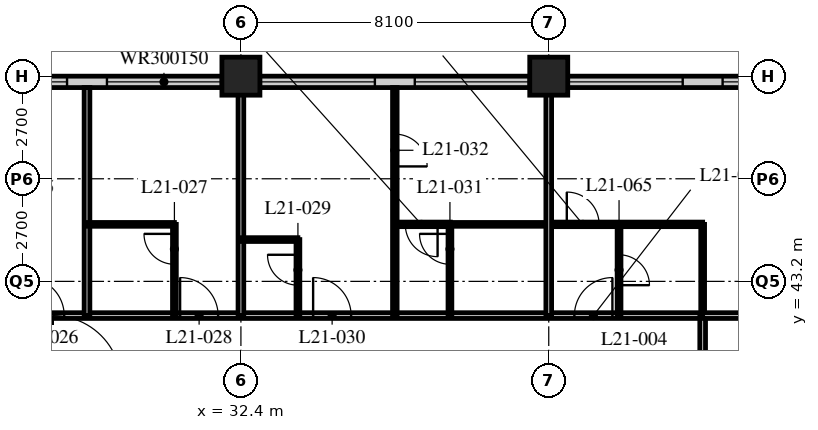
"""IFC4 building model, lengths in metres.
Left out: names, types, materials, properties, quantities, classifications, styles, units other than length and angle.
Written with IfcOpenShell. Run it as: python <this file> out.ifc"""

import sys

from ifc_helpers import new_model, si_unit, direction, frame, frame_2d, origin, origin_2d, place, context, subcontext, project, spatial, rectangle, hollow_rectangle, extrude, element, fill, save


model = new_model("IFC4")
c1 = context("Model", 3, precision=1e-05, world=origin(), true_north=direction((0.0, 1.0)))
c2 = subcontext(c1, "Body", "Model", "MODEL_VIEW")
j1 = project(units=[si_unit("LENGTHUNIT", "METRE"), si_unit("PLANEANGLEUNIT", "RADIAN")], contexts=[c1])
p1 = place(None, origin())
s1 = spatial("IfcSite", under=j1, at=p1, CompositionType="ELEMENT")
p2 = place(p1, origin())
s2 = spatial("IfcBuilding", under=s1, at=p2, CompositionType="ELEMENT")
p3 = place(p2, frame((0.0, 0.0, 84.0)))
s3 = spatial("IfcBuildingStorey", under=s2, at=p3, CompositionType="ELEMENT", Elevation=84.0)
for number, where, z_axis, x_axis in (
    (1, (32.4, 48.6, 0.0), (0.0, 0.0, 1.0), (1.0, 0.0, 0.0)),
    (2, (40.5, 48.6, 0.0), (0.0, 0.0, 1.0), (1.0, 0.0, 0.0)),
):
    element("IfcColumn", number, at=place(p3, frame(where, z_axis=z_axis, x_axis=x_axis)), inside=s3, PredefinedType="COLUMN", context=c2, shape_type="SweptSolid", body=[
        extrude(hollow_rectangle(XDim=1.0, YDim=1.0, WallThickness=0.1, at=origin_2d()), origin(), (0.0, 0.0, 1.0), 3.4),
    ])
p4 = place(p3, frame((48.3, 48.45, 0.0), z_axis=(0.0, 0.0, 1.0), x_axis=(-1.0, 0.0, 0.0)))
e3 = element("IfcWall", 3, at=p4, inside=s3, PredefinedType="SOLIDWALL", context=c2, shape_type="SweptSolid", body=[
    extrude(rectangle(XDim=40.2, YDim=0.3, at=frame_2d((20.1, 0.0))), origin(), (0.0, 0.0, 1.0), 3.19),
])
p5 = place(p4, frame((0.225, 0.0, 0.9)))
e4 = element("IfcOpeningElement", 4, at=p5, cuts=e3, PredefinedType="OPENING", context=c2, shape_type="SweptSolid", body=[
    extrude(rectangle(XDim=3.0, YDim=1.5, at=frame_2d((1.5, 0.75))), frame((0.0, 0.16, 0.0), z_axis=(0.0, -1.0, 0.0), x_axis=(1.0, 0.0, 0.0)), (0.0, 0.0, 1.0), 0.32),
])
p6 = place(p4, frame((4.275, 0.0, 0.9)))
e5 = element("IfcOpeningElement", 5, at=p6, cuts=e3, PredefinedType="OPENING", context=c2, shape_type="SweptSolid", body=[
    extrude(rectangle(XDim=3.0, YDim=1.5, at=frame_2d((1.5, 0.75))), frame((0.0, 0.16, 0.0), z_axis=(0.0, -1.0, 0.0), x_axis=(1.0, 0.0, 0.0)), (0.0, 0.0, 1.0), 0.32),
])
p7 = place(p4, frame((8.325, 0.0, 0.9)))
e6 = element("IfcOpeningElement", 6, at=p7, cuts=e3, PredefinedType="OPENING", context=c2, shape_type="SweptSolid", body=[
    extrude(rectangle(XDim=3.0, YDim=1.5, at=frame_2d((1.5, 0.75))), frame((0.0, 0.16, 0.0), z_axis=(0.0, -1.0, 0.0), x_axis=(1.0, 0.0, 0.0)), (0.0, 0.0, 1.0), 0.32),
])
p8 = place(p4, frame((12.375, 0.0, 0.9)))
e7 = element("IfcOpeningElement", 7, at=p8, cuts=e3, PredefinedType="OPENING", context=c2, shape_type="SweptSolid", body=[
    extrude(rectangle(XDim=3.0, YDim=1.5, at=frame_2d((1.5, 0.75))), frame((0.0, 0.16, 0.0), z_axis=(0.0, -1.0, 0.0), x_axis=(1.0, 0.0, 0.0)), (0.0, 0.0, 1.0), 0.32),
])
p9 = place(p4, frame((16.425, 0.0, 0.9)))
e8 = element("IfcOpeningElement", 8, at=p9, cuts=e3, PredefinedType="OPENING", context=c2, shape_type="SweptSolid", body=[
    extrude(rectangle(XDim=3.0, YDim=1.5, at=frame_2d((1.5, 0.75))), frame((0.0, 0.16, 0.0), z_axis=(0.0, -1.0, 0.0), x_axis=(1.0, 0.0, 0.0)), (0.0, 0.0, 1.0), 0.32),
])
p10 = place(p4, frame((20.475, 0.0, 0.9)))
e9 = element("IfcOpeningElement", 9, at=p10, cuts=e3, PredefinedType="OPENING", context=c2, shape_type="SweptSolid", body=[
    extrude(rectangle(XDim=3.0, YDim=1.5, at=frame_2d((1.5, 0.75))), frame((0.0, 0.16, 0.0), z_axis=(0.0, -1.0, 0.0), x_axis=(1.0, 0.0, 0.0)), (0.0, 0.0, 1.0), 0.32),
])
p11 = place(p4, frame((24.525, 0.0, 0.9)))
e10 = element("IfcOpeningElement", 10, at=p11, cuts=e3, PredefinedType="OPENING", context=c2, shape_type="SweptSolid", body=[
    extrude(rectangle(XDim=3.0, YDim=1.5, at=frame_2d((1.5, 0.75))), frame((0.0, 0.16, 0.0), z_axis=(0.0, -1.0, 0.0), x_axis=(1.0, 0.0, 0.0)), (0.0, 0.0, 1.0), 0.32),
])
p12 = place(p4, frame((28.575, 0.0, 0.9)))
e11 = element("IfcOpeningElement", 11, at=p12, cuts=e3, PredefinedType="OPENING", context=c2, shape_type="SweptSolid", body=[
    extrude(rectangle(XDim=3.0, YDim=1.5, at=frame_2d((1.5, 0.75))), frame((0.0, 0.16, 0.0), z_axis=(0.0, -1.0, 0.0), x_axis=(1.0, 0.0, 0.0)), (0.0, 0.0, 1.0), 0.32),
])
p13 = place(p4, frame((32.625, 0.0, 0.9)))
e12 = element("IfcOpeningElement", 12, at=p13, cuts=e3, PredefinedType="OPENING", context=c2, shape_type="SweptSolid", body=[
    extrude(rectangle(XDim=3.0, YDim=1.5, at=frame_2d((1.5, 0.75))), frame((0.0, 0.16, 0.0), z_axis=(0.0, -1.0, 0.0), x_axis=(1.0, 0.0, 0.0)), (0.0, 0.0, 1.0), 0.32),
])
p14 = place(p4, frame((36.675, 0.0, 0.9)))
e13 = element("IfcOpeningElement", 13, at=p14, cuts=e3, PredefinedType="OPENING", context=c2, shape_type="SweptSolid", body=[
    extrude(rectangle(XDim=3.0, YDim=1.5, at=frame_2d((1.5, 0.75))), frame((0.0, 0.16, 0.0), z_axis=(0.0, -1.0, 0.0), x_axis=(1.0, 0.0, 0.0)), (0.0, 0.0, 1.0), 0.32),
])
p15 = place(p3, frame((12.15, 42.3, 0.0), z_axis=(0.0, 0.0, 1.0), x_axis=(1.0, 0.0, 0.0)))
e14 = element("IfcWall", 14, at=p15, inside=s3, PredefinedType="PARTITIONING", context=c2, shape_type="SweptSolid", body=[
    extrude(rectangle(XDim=32.4, YDim=0.15, at=frame_2d((16.2, 0.0))), origin(), (0.0, 0.0, 1.0), 3.19),
])
p16 = place(p15, frame((5.95, 0.0, 0.0)))
e15 = element("IfcOpeningElement", 15, at=p16, cuts=e14, PredefinedType="OPENING", context=c2, shape_type="SweptSolid", body=[
    extrude(rectangle(XDim=1.0, YDim=2.1, at=frame_2d((0.5, 1.05))), frame((0.0, 0.085, 0.0), z_axis=(0.0, -1.0, 0.0), x_axis=(1.0, 0.0, 0.0)), (0.0, 0.0, 1.0), 0.17),
])
p17 = place(p15, frame((14.6, 0.0, 0.0)))
e16 = element("IfcOpeningElement", 16, at=p17, cuts=e14, PredefinedType="OPENING", context=c2, shape_type="SweptSolid", body=[
    extrude(rectangle(XDim=1.0, YDim=2.1, at=frame_2d((0.5, 1.05))), frame((0.0, 0.085, 0.0), z_axis=(0.0, -1.0, 0.0), x_axis=(1.0, 0.0, 0.0)), (0.0, 0.0, 1.0), 0.17),
])
p18 = place(p15, frame((18.65, 0.0, 0.0)))
e17 = element("IfcOpeningElement", 17, at=p18, cuts=e14, PredefinedType="OPENING", context=c2, shape_type="SweptSolid", body=[
    extrude(rectangle(XDim=1.0, YDim=2.1, at=frame_2d((0.5, 1.05))), frame((0.0, 0.085, 0.0), z_axis=(0.0, -1.0, 0.0), x_axis=(1.0, 0.0, 0.0)), (0.0, 0.0, 1.0), 0.17),
])
p19 = place(p15, frame((22.15, 0.0, 0.0)))
e18 = element("IfcOpeningElement", 18, at=p19, cuts=e14, PredefinedType="OPENING", context=c2, shape_type="SweptSolid", body=[
    extrude(rectangle(XDim=1.0, YDim=2.1, at=frame_2d((0.5, 1.05))), frame((0.0, 0.085, 0.0), z_axis=(0.0, -1.0, 0.0), x_axis=(1.0, 0.0, 0.0)), (0.0, 0.0, 1.0), 0.17),
])
p20 = place(p15, frame((29.025, 0.0, 0.0)))
e19 = element("IfcOpeningElement", 19, at=p20, cuts=e14, PredefinedType="OPENING", context=c2, shape_type="SweptSolid", body=[
    extrude(rectangle(XDim=1.0, YDim=2.1, at=frame_2d((0.5, 1.05))), frame((0.0, 0.085, 0.0), z_axis=(0.0, -1.0, 0.0), x_axis=(1.0, 0.0, 0.0)), (0.0, 0.0, 1.0), 0.17),
])
p21 = place(p15, frame((2.375, 0.0, 0.0)))
e20 = element("IfcOpeningElement", 20, at=p21, cuts=e14, PredefinedType="OPENING", context=c2, shape_type="SweptSolid", body=[
    extrude(rectangle(XDim=1.0, YDim=2.1, at=frame_2d((0.5, 1.05))), frame((0.0, 0.085, 0.0), z_axis=(0.0, -1.0, 0.0), x_axis=(1.0, 0.0, 0.0)), (0.0, 0.0, 1.0), 0.17),
])
p22 = place(p3, frame((44.55, 16.2, 0.0), z_axis=(0.0, 0.0, 1.0), x_axis=(0.0, 1.0, 0.0)))
e21 = element("IfcWall", 21, at=p22, inside=s3, PredefinedType="PARTITIONING", context=c2, shape_type="SweptSolid", body=[
    extrude(rectangle(XDim=26.1, YDim=0.15, at=frame_2d((13.05, 0.0))), origin(), (0.0, 0.0, 1.0), 3.19),
])
p23 = place(p22, frame((2.75, 0.0, 0.0)))
e22 = element("IfcOpeningElement", 22, at=p23, cuts=e21, PredefinedType="OPENING", context=c2, shape_type="SweptSolid", body=[
    extrude(rectangle(XDim=1.0, YDim=2.1, at=frame_2d((0.5, 1.05))), frame((0.0, 0.085, 0.0), z_axis=(0.0, -1.0, 0.0), x_axis=(1.0, 0.0, 0.0)), (0.0, 0.0, 1.0), 0.17),
])
p24 = place(p22, frame((6.5, 0.0, 0.0)))
e23 = element("IfcOpeningElement", 23, at=p24, cuts=e21, PredefinedType="OPENING", context=c2, shape_type="SweptSolid", body=[
    extrude(rectangle(XDim=1.0, YDim=2.1, at=frame_2d((0.5, 1.05))), frame((0.0, 0.085, 0.0), z_axis=(0.0, -1.0, 0.0), x_axis=(1.0, 0.0, 0.0)), (0.0, 0.0, 1.0), 0.17),
])
p25 = place(p22, frame((10.0, 0.0, 0.0)))
e24 = element("IfcOpeningElement", 24, at=p25, cuts=e21, PredefinedType="OPENING", context=c2, shape_type="SweptSolid", body=[
    extrude(rectangle(XDim=1.0, YDim=2.1, at=frame_2d((0.5, 1.05))), frame((0.0, 0.085, 0.0), z_axis=(0.0, -1.0, 0.0), x_axis=(1.0, 0.0, 0.0)), (0.0, 0.0, 1.0), 0.17),
])
p26 = place(p22, frame((18.1, 0.0, 0.0)))
e25 = element("IfcOpeningElement", 25, at=p26, cuts=e21, PredefinedType="OPENING", context=c2, shape_type="SweptSolid", body=[
    extrude(rectangle(XDim=1.0, YDim=2.1, at=frame_2d((0.5, 1.05))), frame((0.0, 0.085, 0.0), z_axis=(0.0, -1.0, 0.0), x_axis=(1.0, 0.0, 0.0)), (0.0, 0.0, 1.0), 0.17),
])
p27 = place(p3, frame((28.35, 42.3, 0.0), z_axis=(0.0, 0.0, 1.0), x_axis=(0.0, 1.0, 0.0)))
e26 = element("IfcWall", 26, at=p27, inside=s3, PredefinedType="PARTITIONING", context=c2, shape_type="SweptSolid", body=[
    extrude(rectangle(XDim=6.0, YDim=0.15, at=frame_2d((3.0, 0.0))), origin(), (0.0, 0.0, 1.0), 3.19),
])
p28 = place(p3, frame((28.35, 44.7, 0.0), z_axis=(0.0, 0.0, 1.0), x_axis=(1.0, 0.0, 0.0)))
e27 = element("IfcWall", 27, at=p28, inside=s3, PredefinedType="PARTITIONING", context=c2, shape_type="SweptSolid", body=[
    extrude(rectangle(XDim=2.3, YDim=0.1, at=frame_2d((1.15, 0.0))), origin(), (0.0, 0.0, 1.0), 3.19),
])
p29 = place(p3, frame((30.65, 42.3, 0.0), z_axis=(0.0, 0.0, 1.0), x_axis=(0.0, 1.0, 0.0)))
e28 = element("IfcWall", 28, at=p29, inside=s3, PredefinedType="PARTITIONING", context=c2, shape_type="SweptSolid", body=[
    extrude(rectangle(XDim=2.4, YDim=0.1, at=frame_2d((1.2, 0.0))), origin(), (0.0, 0.0, 1.0), 3.19),
])
p30 = place(p29, frame((1.35, 0.0, 0.0)))
e29 = element("IfcOpeningElement", 29, at=p30, cuts=e28, PredefinedType="OPENING", context=c2, shape_type="SweptSolid", body=[
    extrude(rectangle(XDim=0.8, YDim=2.1, at=frame_2d((0.4, 1.05))), frame((0.0, 0.06, 0.0), z_axis=(0.0, -1.0, 0.0), x_axis=(1.0, 0.0, 0.0)), (0.0, 0.0, 1.0), 0.12),
])
p31 = place(p3, frame((32.4, 42.3, 0.0), z_axis=(0.0, 0.0, 1.0), x_axis=(0.0, 1.0, 0.0)))
e30 = element("IfcWall", 30, at=p31, inside=s3, PredefinedType="PARTITIONING", context=c2, shape_type="SweptSolid", body=[
    extrude(rectangle(XDim=6.0, YDim=0.15, at=frame_2d((3.0, 0.0))), origin(), (0.0, 0.0, 1.0), 2.428),
])
p32 = place(p3, frame((32.4, 44.3, 0.0), z_axis=(0.0, 0.0, 1.0), x_axis=(1.0, 0.0, 0.0)))
e31 = element("IfcWall", 31, at=p32, inside=s3, PredefinedType="PARTITIONING", context=c2, shape_type="SweptSolid", body=[
    extrude(rectangle(XDim=1.5, YDim=0.1, at=frame_2d((0.75, 0.0))), origin(), (0.0, 0.0, 1.0), 3.19),
])
p33 = place(p3, frame((33.9, 42.3, 0.0), z_axis=(0.0, 0.0, 1.0), x_axis=(0.0, 1.0, 0.0)))
e32 = element("IfcWall", 32, at=p33, inside=s3, PredefinedType="PARTITIONING", context=c2, shape_type="SweptSolid", body=[
    extrude(rectangle(XDim=2.0, YDim=0.1, at=frame_2d((1.0, 0.0))), origin(), (0.0, 0.0, 1.0), 3.19),
])
p34 = place(p33, frame((0.8, 0.0, 0.0)))
e33 = element("IfcOpeningElement", 33, at=p34, cuts=e32, PredefinedType="OPENING", context=c2, shape_type="SweptSolid", body=[
    extrude(rectangle(XDim=0.8, YDim=2.1, at=frame_2d((0.4, 1.05))), frame((0.0, 0.06, 0.0), z_axis=(0.0, -1.0, 0.0), x_axis=(1.0, 0.0, 0.0)), (0.0, 0.0, 1.0), 0.12),
])
p35 = place(p3, frame((37.9, 44.7, 0.0), z_axis=(0.0, 0.0, 1.0), x_axis=(1.0, 0.0, 0.0)))
e34 = element("IfcWall", 34, at=p35, inside=s3, PredefinedType="PARTITIONING", context=c2, shape_type="SweptSolid", body=[
    extrude(rectangle(XDim=2.6, YDim=0.1, at=frame_2d((1.3, 0.0))), origin(), (0.0, 0.0, 1.0), 3.19),
])
p36 = place(p3, frame((37.9, 42.3, 0.0), z_axis=(0.0, 0.0, 1.0), x_axis=(0.0, 1.0, 0.0)))
e35 = element("IfcWall", 35, at=p36, inside=s3, PredefinedType="PARTITIONING", context=c2, shape_type="SweptSolid", body=[
    extrude(rectangle(XDim=2.4, YDim=0.1, at=frame_2d((1.2, 0.0))), origin(), (0.0, 0.0, 1.0), 3.19),
])
p37 = place(p36, frame((1.35, 0.0, 0.0)))
e36 = element("IfcOpeningElement", 36, at=p37, cuts=e35, PredefinedType="OPENING", context=c2, shape_type="SweptSolid", body=[
    extrude(rectangle(XDim=0.8, YDim=2.1, at=frame_2d((0.4, 1.05))), frame((0.0, 0.06, 0.0), z_axis=(0.0, -1.0, 0.0), x_axis=(1.0, 0.0, 0.0)), (0.0, 0.0, 1.0), 0.12),
])
p38 = place(p3, frame((36.45, 42.3, 0.0), z_axis=(0.0, 0.0, 1.0), x_axis=(0.0, 1.0, 0.0)))
e37 = element("IfcWall", 37, at=p38, inside=s3, PredefinedType="PARTITIONING", context=c2, shape_type="SweptSolid", body=[
    extrude(rectangle(XDim=6.0, YDim=0.12, at=frame_2d((3.0, 0.0))), origin(), (0.0, 0.0, 1.0), 3.19),
])
p39 = place(p38, frame((3.925, 0.0, 0.0)))
e38 = element("IfcOpeningElement", 38, at=p39, cuts=e37, PredefinedType="OPENING", context=c2, shape_type="SweptSolid", body=[
    extrude(rectangle(XDim=0.85, YDim=2.1, at=frame_2d((0.425, 1.05))), frame((0.0, 0.07, 0.0), z_axis=(0.0, -1.0, 0.0), x_axis=(1.0, 0.0, 0.0)), (0.0, 0.0, 1.0), 0.14),
])
p40 = place(p3, frame((40.5, 44.7, 0.0), z_axis=(0.0, 0.0, 1.0), x_axis=(1.0, 0.0, 0.0)))
e39 = element("IfcWall", 39, at=p40, inside=s3, PredefinedType="PARTITIONING", context=c2, shape_type="SweptSolid", body=[
    extrude(rectangle(XDim=4.05, YDim=0.12, at=frame_2d((2.025, 0.0))), origin(), (0.0, 0.0, 1.0), 3.19),
])
p41 = place(p40, frame((0.475, 0.0, 0.0)))
e40 = element("IfcOpeningElement", 40, at=p41, cuts=e39, PredefinedType="OPENING", context=c2, shape_type="SweptSolid", body=[
    extrude(rectangle(XDim=0.85, YDim=2.1, at=frame_2d((0.425, 1.05))), frame((0.0, 0.07, 0.0), z_axis=(0.0, -1.0, 0.0), x_axis=(1.0, 0.0, 0.0)), (0.0, 0.0, 1.0), 0.14),
])
p42 = place(p3, frame((42.35, 42.3, 0.0), z_axis=(0.0, 0.0, 1.0), x_axis=(0.0, 1.0, 0.0)))
e41 = element("IfcWall", 41, at=p42, inside=s3, PredefinedType="PARTITIONING", context=c2, shape_type="SweptSolid", body=[
    extrude(rectangle(XDim=2.4, YDim=0.1, at=frame_2d((1.2, 0.0))), origin(), (0.0, 0.0, 1.0), 3.19),
])
p43 = place(p42, frame((0.8, 0.0, 0.0)))
e42 = element("IfcOpeningElement", 42, at=p43, cuts=e41, PredefinedType="OPENING", context=c2, shape_type="SweptSolid", body=[
    extrude(rectangle(XDim=0.8, YDim=2.1, at=frame_2d((0.4, 1.05))), frame((0.0, 0.06, 0.0), z_axis=(0.0, -1.0, 0.0), x_axis=(1.0, 0.0, 0.0)), (0.0, 0.0, 1.0), 0.12),
])
p44 = place(p3, frame((44.55, 42.3, 0.0), z_axis=(0.0, 0.0, 1.0), x_axis=(0.0, 1.0, 0.0)))
e43 = element("IfcWall", 43, at=p44, inside=s3, PredefinedType="PARTITIONING", context=c2, shape_type="SweptSolid", body=[
    extrude(rectangle(XDim=2.4, YDim=0.1, at=frame_2d((1.2, 0.0))), origin(), (0.0, 0.0, 1.0), 3.19),
])
p45 = place(p3, frame((44.55, 42.3, 0.0), z_axis=(0.0, 0.0, 1.0), x_axis=(1.0, 0.0, 0.0)))
e44 = element("IfcWall", 44, at=p45, inside=s3, PredefinedType="PARTITIONING", context=c2, shape_type="SweptSolid", body=[
    extrude(rectangle(XDim=7.8, YDim=0.15, at=frame_2d((3.9, 0.0))), origin(), (0.0, 0.0, 1.0), 3.19),
])
p46 = place(p3, frame((40.5, 42.3, 0.0), z_axis=(0.0, 0.0, 1.0), x_axis=(0.0, 1.0, 0.0)))
e45 = element("IfcWall", 45, at=p46, inside=s3, PredefinedType="PARTITIONING", context=c2, shape_type="SweptSolid", body=[
    extrude(rectangle(XDim=6.0, YDim=0.15, at=frame_2d((3.0, 0.0))), origin(), (0.0, 0.0, 1.0), 2.428),
])
p47 = place(p3, frame((36.45, 44.7, 0.0), z_axis=(0.0, 0.0, 1.0), x_axis=(1.0, 0.0, 0.0)))
e46 = element("IfcWall", 46, at=p47, inside=s3, PredefinedType="PARTITIONING", context=c2, shape_type="SweptSolid", body=[
    extrude(rectangle(XDim=1.46, YDim=0.12, at=frame_2d((0.73, 0.0))), origin(), (0.0, 0.0, 1.0), 3.19),
])
p48 = place(p47, frame((0.275, 0.0, 0.0)))
e47 = element("IfcOpeningElement", 47, at=p48, cuts=e46, PredefinedType="OPENING", context=c2, shape_type="SweptSolid", body=[
    extrude(rectangle(XDim=0.85, YDim=2.1, at=frame_2d((0.425, 1.05))), frame((0.0, 0.07, 0.0), z_axis=(0.0, -1.0, 0.0), x_axis=(1.0, 0.0, 0.0)), (0.0, 0.0, 1.0), 0.14),
])
p49 = place(p5, origin())
e48 = element("IfcWindow", 48, at=p49, inside=s3, PartitioningType="SINGLE_PANEL", PredefinedType="WINDOW", context=c2, shape_type="SweptSolid", body=[
    extrude(rectangle(XDim=3.0, YDim=1.5, at=frame_2d((1.5, 0.75))), frame((0.0, 0.03, 0.0), z_axis=(0.0, -1.0, 0.0), x_axis=(1.0, 0.0, 0.0)), (0.0, 0.0, 1.0), 0.06),
])
fill(e4, e48)
p50 = place(p6, origin())
e49 = element("IfcWindow", 49, at=p50, inside=s3, PartitioningType="SINGLE_PANEL", PredefinedType="WINDOW", context=c2, shape_type="SweptSolid", body=[
    extrude(rectangle(XDim=3.0, YDim=1.5, at=frame_2d((1.5, 0.75))), frame((0.0, 0.03, 0.0), z_axis=(0.0, -1.0, 0.0), x_axis=(1.0, 0.0, 0.0)), (0.0, 0.0, 1.0), 0.06),
])
fill(e5, e49)
p51 = place(p7, origin())
e50 = element("IfcWindow", 50, at=p51, inside=s3, PartitioningType="SINGLE_PANEL", PredefinedType="WINDOW", context=c2, shape_type="SweptSolid", body=[
    extrude(rectangle(XDim=3.0, YDim=1.5, at=frame_2d((1.5, 0.75))), frame((0.0, 0.03, 0.0), z_axis=(0.0, -1.0, 0.0), x_axis=(1.0, 0.0, 0.0)), (0.0, 0.0, 1.0), 0.06),
])
fill(e6, e50)
p52 = place(p8, origin())
e51 = element("IfcWindow", 51, at=p52, inside=s3, PartitioningType="SINGLE_PANEL", PredefinedType="WINDOW", context=c2, shape_type="SweptSolid", body=[
    extrude(rectangle(XDim=3.0, YDim=1.5, at=frame_2d((1.5, 0.75))), frame((0.0, 0.03, 0.0), z_axis=(0.0, -1.0, 0.0), x_axis=(1.0, 0.0, 0.0)), (0.0, 0.0, 1.0), 0.06),
])
fill(e7, e51)
p53 = place(p9, origin())
e52 = element("IfcWindow", 52, at=p53, inside=s3, PartitioningType="SINGLE_PANEL", PredefinedType="WINDOW", context=c2, shape_type="SweptSolid", body=[
    extrude(rectangle(XDim=3.0, YDim=1.5, at=frame_2d((1.5, 0.75))), frame((0.0, 0.03, 0.0), z_axis=(0.0, -1.0, 0.0), x_axis=(1.0, 0.0, 0.0)), (0.0, 0.0, 1.0), 0.06),
])
fill(e8, e52)
p54 = place(p10, origin())
e53 = element("IfcWindow", 53, at=p54, inside=s3, PartitioningType="SINGLE_PANEL", PredefinedType="WINDOW", context=c2, shape_type="SweptSolid", body=[
    extrude(rectangle(XDim=3.0, YDim=1.5, at=frame_2d((1.5, 0.75))), frame((0.0, 0.03, 0.0), z_axis=(0.0, -1.0, 0.0), x_axis=(1.0, 0.0, 0.0)), (0.0, 0.0, 1.0), 0.06),
])
fill(e9, e53)
p55 = place(p17, origin())
e54 = element("IfcDoor", 54, at=p55, inside=s3, OperationType="SINGLE_SWING_LEFT", PredefinedType="DOOR", context=c2, shape_type="SweptSolid", body=[
    extrude(rectangle(XDim=1.0, YDim=2.1, at=frame_2d((0.5, 1.05))), frame((0.0, 0.025, 0.0), z_axis=(0.0, -1.0, 0.0), x_axis=(1.0, 0.0, 0.0)), (0.0, 0.0, 1.0), 0.05),
])
fill(e16, e54)
p56 = place(p30, origin())
e55 = element("IfcDoor", 55, at=p56, inside=s3, OperationType="SINGLE_SWING_RIGHT", PredefinedType="DOOR", context=c2, shape_type="SweptSolid", body=[
    extrude(rectangle(XDim=0.8, YDim=2.1, at=frame_2d((0.4, 1.05))), frame((0.0, 0.025, 0.0), z_axis=(0.0, -1.0, 0.0), x_axis=(1.0, 0.0, 0.0)), (0.0, 0.0, 1.0), 0.05),
])
fill(e29, e55)
p57 = place(p18, origin())
e56 = element("IfcDoor", 56, at=p57, inside=s3, OperationType="SINGLE_SWING_LEFT", PredefinedType="DOOR", context=c2, shape_type="SweptSolid", body=[
    extrude(rectangle(XDim=1.0, YDim=2.1, at=frame_2d((0.5, 1.05))), frame((0.0, 0.025, 0.0), z_axis=(0.0, -1.0, 0.0), x_axis=(1.0, 0.0, 0.0)), (0.0, 0.0, 1.0), 0.05),
])
fill(e17, e56)
p58 = place(p34, origin())
e57 = element("IfcDoor", 57, at=p58, inside=s3, OperationType="SINGLE_SWING_RIGHT", PredefinedType="DOOR", context=c2, shape_type="SweptSolid", body=[
    extrude(rectangle(XDim=0.8, YDim=2.1, at=frame_2d((0.4, 1.05))), frame((0.0, 0.025, 0.0), z_axis=(0.0, -1.0, 0.0), x_axis=(1.0, 0.0, 0.0)), (0.0, 0.0, 1.0), 0.05),
])
fill(e33, e57)
p59 = place(p19, origin())
e58 = element("IfcDoor", 58, at=p59, inside=s3, OperationType="SINGLE_SWING_LEFT", PredefinedType="DOOR", context=c2, shape_type="SweptSolid", body=[
    extrude(rectangle(XDim=1.0, YDim=2.1, at=frame_2d((0.5, 1.05))), frame((0.0, 0.025, 0.0), z_axis=(0.0, -1.0, 0.0), x_axis=(1.0, 0.0, 0.0)), (0.0, 0.0, 1.0), 0.05),
])
fill(e18, e58)
p60 = place(p37, origin())
e59 = element("IfcDoor", 59, at=p60, inside=s3, OperationType="SINGLE_SWING_RIGHT", PredefinedType="DOOR", context=c2, shape_type="SweptSolid", body=[
    extrude(rectangle(XDim=0.8, YDim=2.1, at=frame_2d((0.4, 1.05))), frame((0.0, 0.025, 0.0), z_axis=(0.0, -1.0, 0.0), x_axis=(1.0, 0.0, 0.0)), (0.0, 0.0, 1.0), 0.05),
])
fill(e36, e59)
p61 = place(p39, origin())
e60 = element("IfcDoor", 60, at=p61, inside=s3, OperationType="SINGLE_SWING_RIGHT", PredefinedType="DOOR", context=c2, shape_type="SweptSolid", body=[
    extrude(rectangle(XDim=0.85, YDim=2.1, at=frame_2d((0.425, 1.05))), frame((0.0, 0.025, 0.0), z_axis=(0.0, -1.0, 0.0), x_axis=(1.0, 0.0, 0.0)), (0.0, 0.0, 1.0), 0.05),
])
fill(e38, e60)
p62 = place(p43, origin())
e61 = element("IfcDoor", 61, at=p62, inside=s3, OperationType="SINGLE_SWING_RIGHT", PredefinedType="DOOR", context=c2, shape_type="SweptSolid", body=[
    extrude(rectangle(XDim=0.8, YDim=2.1, at=frame_2d((0.4, 1.05))), frame((0.0, 0.025, 0.0), z_axis=(0.0, -1.0, 0.0), x_axis=(1.0, 0.0, 0.0)), (0.0, 0.0, 1.0), 0.05),
])
fill(e42, e61)
p63 = place(p20, origin())
e62 = element("IfcDoor", 62, at=p63, inside=s3, OperationType="SINGLE_SWING_RIGHT", PredefinedType="DOOR", context=c2, shape_type="SweptSolid", body=[
    extrude(rectangle(XDim=1.0, YDim=2.1, at=frame_2d((0.5, 1.05))), frame((0.0, 0.025, 0.0), z_axis=(0.0, -1.0, 0.0), x_axis=(1.0, 0.0, 0.0)), (0.0, 0.0, 1.0), 0.05),
])
fill(e19, e62)
p64 = place(p41, origin())
e63 = element("IfcDoor", 63, at=p64, inside=s3, OperationType="SINGLE_SWING_LEFT", PredefinedType="DOOR", context=c2, shape_type="SweptSolid", body=[
    extrude(rectangle(XDim=0.85, YDim=2.1, at=frame_2d((0.425, 1.05))), frame((0.0, 0.025, 0.0), z_axis=(0.0, -1.0, 0.0), x_axis=(1.0, 0.0, 0.0)), (0.0, 0.0, 1.0), 0.05),
])
fill(e40, e63)
p65 = place(p48, origin())
e64 = element("IfcDoor", 64, at=p65, inside=s3, OperationType="SINGLE_SWING_LEFT", PredefinedType="DOOR", context=c2, shape_type="SweptSolid", body=[
    extrude(rectangle(XDim=0.85, YDim=2.1, at=frame_2d((0.425, 1.05))), frame((0.0, 0.025, 0.0), z_axis=(0.0, -1.0, 0.0), x_axis=(1.0, 0.0, 0.0)), (0.0, 0.0, 1.0), 0.05),
])
fill(e47, e64)
save(model, sys.argv[1])
